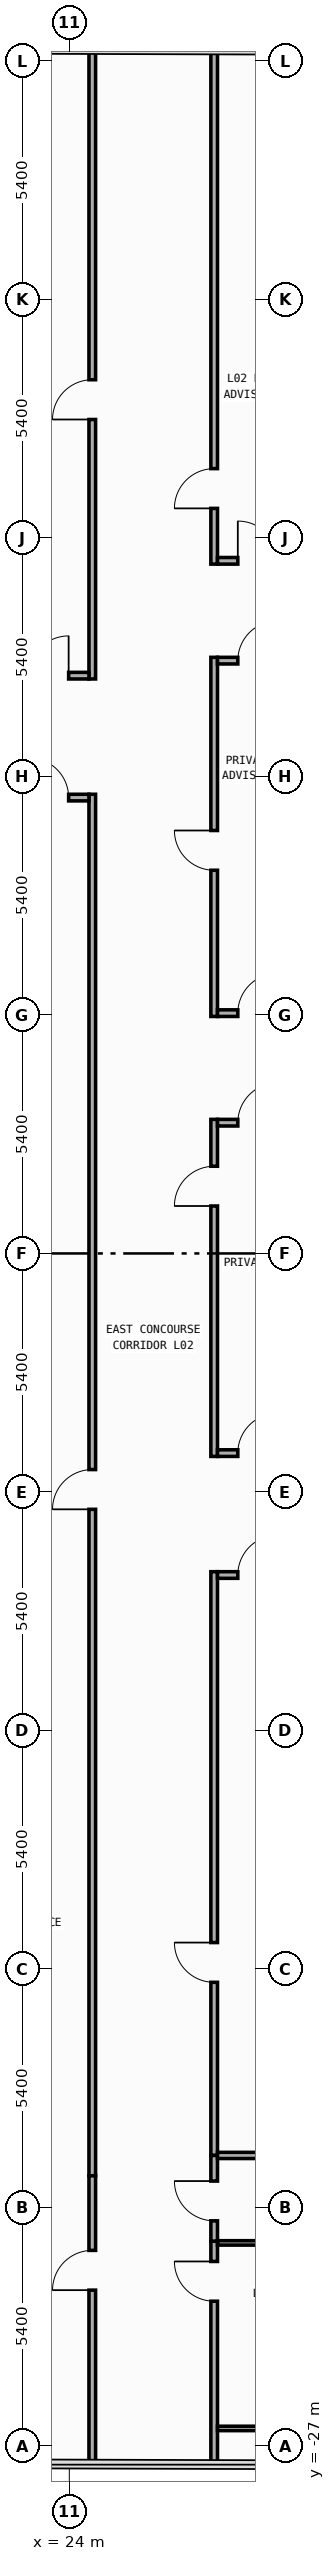
"""IFC4 building model, lengths in metres.
Left out: names, types, materials, properties, quantities, classifications, styles, units other than length and angle.
Written with IfcOpenShell. Run it as: python <this file> out.ifc"""

import sys

from ifc_helpers import new_model, si_unit, direction, frame, frame_2d, origin, place, context, subcontext, project, spatial, rectangle, extrude, element, fill, save


model = new_model("IFC4")
c1 = context("Model", 3, precision=1e-05, world=origin(), true_north=direction((0.0, 1.0)))
c2 = subcontext(c1, "Body", "Model", "MODEL_VIEW")
j1 = project(units=[si_unit("LENGTHUNIT", "METRE"), si_unit("PLANEANGLEUNIT", "RADIAN")], contexts=[c1])
p1 = place(None, origin())
s1 = spatial("IfcSite", under=j1, at=p1, CompositionType="ELEMENT")
p2 = place(p1, origin())
s2 = spatial("IfcBuilding", under=s1, at=p2, CompositionType="ELEMENT")
p3 = place(p2, frame((0.0, 0.0, 6.0)))
s3 = spatial("IfcBuildingStorey", under=s2, at=p3, CompositionType="ELEMENT", Elevation=6.0)
p4 = place(p3, frame((27.28, -4.595, 0.0), z_axis=(0.0, 0.0, 1.0), x_axis=(0.0, 1.0, 0.0)))
e1 = element("IfcWall", 1, at=p4, inside=s3, PredefinedType="PARTITIONING", context=c2, shape_type="SweptSolid", body=[
    extrude(rectangle(XDim=7.63, YDim=0.15, at=frame_2d((3.815, 0.0))), origin(), (0.0, 0.0, 1.0), 4.7),
])
p5 = place(p4, frame((5.669, 0.0, 0.0)))
e2 = element("IfcOpeningElement", 2, at=p5, cuts=e1, PredefinedType="OPENING", context=c2, shape_type="SweptSolid", body=[
    extrude(rectangle(XDim=0.9, YDim=2.15, at=frame_2d((0.45, 1.075))), frame((0.0, 0.085, 0.0), z_axis=(0.0, -1.0, 0.0), x_axis=(1.0, 0.0, 0.0)), (0.0, 0.0, 1.0), 0.17),
])
p6 = place(p3, frame((27.28, 5.365, 0.0), z_axis=(0.0, 0.0, 1.0), x_axis=(0.0, 1.0, 0.0)))
e3 = element("IfcWall", 3, at=p6, inside=s3, PredefinedType="PARTITIONING", context=c2, shape_type="SweptSolid", body=[
    extrude(rectangle(XDim=8.13, YDim=0.15, at=frame_2d((4.065, 0.0))), origin(), (0.0, 0.0, 1.0), 4.7),
])
p7 = place(p6, frame((3.31, 0.0, 0.0)))
e4 = element("IfcOpeningElement", 4, at=p7, cuts=e3, PredefinedType="OPENING", context=c2, shape_type="SweptSolid", body=[
    extrude(rectangle(XDim=0.9, YDim=2.15, at=frame_2d((0.45, 1.075))), frame((0.0, 0.085, 0.0), z_axis=(0.0, -1.0, 0.0), x_axis=(1.0, 0.0, 0.0)), (0.0, 0.0, 1.0), 0.17),
])
p8 = place(p3, frame((24.52, 13.005, 0.0), z_axis=(0.0, 0.0, 1.0), x_axis=(0.0, 1.0, 0.0)))
e5 = element("IfcWall", 5, at=p8, inside=s3, PredefinedType="PARTITIONING", context=c2, shape_type="SweptSolid", body=[
    extrude(rectangle(XDim=14.253, YDim=0.15, at=frame_2d((7.126, 0.0))), origin(), (0.0, 0.0, 1.0), 4.7),
])
p9 = place(p8, frame((5.874, 0.0, 0.0)))
e6 = element("IfcOpeningElement", 6, at=p9, cuts=e5, PredefinedType="OPENING", context=c2, shape_type="SweptSolid", body=[
    extrude(rectangle(XDim=0.9, YDim=2.15, at=frame_2d((0.45, 1.075))), frame((0.0, 0.085, 0.0), z_axis=(0.0, -1.0, 0.0), x_axis=(1.0, 0.0, 0.0)), (0.0, 0.0, 1.0), 0.17),
])
p10 = place(p3, frame((27.28, -27.421, 0.0), z_axis=(0.0, 0.0, 1.0), x_axis=(0.0, 1.0, 0.0)))
e7 = element("IfcWall", 7, at=p10, inside=s3, PredefinedType="PARTITIONING", context=c2, shape_type="SweptSolid", body=[
    extrude(rectangle(XDim=5.061, YDim=0.15, at=frame_2d((2.531, 0.0))), origin(), (0.0, 0.0, 1.0), 4.7),
])
p11 = place(p10, frame((3.701, 0.0, 0.0)))
e8 = element("IfcOpeningElement", 8, at=p11, cuts=e7, PredefinedType="OPENING", context=c2, shape_type="SweptSolid", body=[
    extrude(rectangle(XDim=0.9, YDim=2.15, at=frame_2d((0.45, 1.075))), frame((0.0, 0.085, 0.0), z_axis=(0.0, -1.0, 0.0), x_axis=(1.0, 0.0, 0.0)), (0.0, 0.0, 1.0), 0.17),
])
p12 = place(p3, frame((24.52, -20.88, 0.0), z_axis=(0.0, 0.0, 1.0), x_axis=(0.0, 1.0, 0.0)))
e9 = element("IfcWall", 9, at=p12, inside=s3, PredefinedType="PARTITIONING", context=c2, shape_type="SweptSolid", body=[
    extrude(rectangle(XDim=31.275, YDim=0.15, at=frame_2d((15.637, 0.0))), origin(), (0.0, 0.0, 1.0), 4.7),
])
p13 = place(p12, frame((15.087, 0.0, 0.0)))
e10 = element("IfcOpeningElement", 10, at=p13, cuts=e9, PredefinedType="OPENING", context=c2, shape_type="SweptSolid", body=[
    extrude(rectangle(XDim=0.9, YDim=2.15, at=frame_2d((0.45, 1.075))), frame((0.0, 0.085, 0.0), z_axis=(0.0, -1.0, 0.0), x_axis=(1.0, 0.0, 0.0)), (0.0, 0.0, 1.0), 0.17),
])
p14 = place(p3, frame((27.28, -20.42, 0.0), z_axis=(0.0, 0.0, 1.0), x_axis=(0.0, 1.0, 0.0)))
e11 = element("IfcWall", 11, at=p14, inside=s3, PredefinedType="PARTITIONING", context=c2, shape_type="SweptSolid", body=[
    extrude(rectangle(XDim=13.215, YDim=0.15, at=frame_2d((6.607, 0.0))), origin(), (0.0, 0.0, 1.0), 4.7),
])
p15 = place(p14, frame((3.919, 0.0, 0.0)))
e12 = element("IfcOpeningElement", 12, at=p15, cuts=e11, PredefinedType="OPENING", context=c2, shape_type="SweptSolid", body=[
    extrude(rectangle(XDim=0.9, YDim=2.15, at=frame_2d((0.45, 1.075))), frame((0.0, 0.085, 0.0), z_axis=(0.0, -1.0, 0.0), x_axis=(1.0, 0.0, 0.0)), (0.0, 0.0, 1.0), 0.17),
])
p16 = place(p3, frame((24.52, -27.413, 0.0), z_axis=(0.0, 0.0, 1.0), x_axis=(0.0, 1.0, 0.0)))
e13 = element("IfcWall", 13, at=p16, inside=s3, PredefinedType="PARTITIONING", context=c2, shape_type="SweptSolid", body=[
    extrude(rectangle(XDim=6.533, YDim=0.15, at=frame_2d((3.266, 0.0))), origin(), (0.0, 0.0, 1.0), 4.7),
])
p17 = place(p16, frame((3.943, 0.0, 0.0)))
e14 = element("IfcOpeningElement", 14, at=p17, cuts=e13, PredefinedType="OPENING", context=c2, shape_type="SweptSolid", body=[
    extrude(rectangle(XDim=0.9, YDim=2.15, at=frame_2d((0.45, 1.075))), frame((0.0, 0.085, 0.0), z_axis=(0.0, -1.0, 0.0), x_axis=(1.0, 0.0, 0.0)), (0.0, 0.0, 1.0), 0.17),
])
p18 = place(p3, frame((27.28, -22.36, 0.0), z_axis=(0.0, 0.0, 1.0), x_axis=(0.0, 1.0, 0.0)))
e15 = element("IfcWall", 15, at=p18, inside=s3, PredefinedType="PARTITIONING", context=c2, shape_type="SweptSolid", body=[
    extrude(rectangle(XDim=1.94, YDim=0.15, at=frame_2d((0.97, 0.0))), origin(), (0.0, 0.0, 1.0), 4.7),
])
p19 = place(p18, frame((0.46, 0.0, 0.0)))
e16 = element("IfcOpeningElement", 16, at=p19, cuts=e15, PredefinedType="OPENING", context=c2, shape_type="SweptSolid", body=[
    extrude(rectangle(XDim=0.9, YDim=2.15, at=frame_2d((0.45, 1.075))), frame((0.0, 0.085, 0.0), z_axis=(0.0, -1.0, 0.0), x_axis=(1.0, 0.0, 0.0)), (0.0, 0.0, 1.0), 0.17),
])
p20 = place(p3, frame((27.28, 15.605, 0.0), z_axis=(0.0, 0.0, 1.0), x_axis=(0.0, 1.0, 0.0)))
e17 = element("IfcWall", 17, at=p20, inside=s3, PredefinedType="PARTITIONING", context=c2, shape_type="SweptSolid", body=[
    extrude(rectangle(XDim=11.644, YDim=0.15, at=frame_2d((5.822, 0.0))), origin(), (0.0, 0.0, 1.0), 4.7),
])
p21 = place(p20, frame((1.262, 0.0, 0.0)))
e18 = element("IfcOpeningElement", 18, at=p21, cuts=e17, PredefinedType="OPENING", context=c2, shape_type="SweptSolid", body=[
    extrude(rectangle(XDim=0.9, YDim=2.15, at=frame_2d((0.45, 1.075))), frame((0.0, 0.085, 0.0), z_axis=(0.0, -1.0, 0.0), x_axis=(1.0, 0.0, 0.0)), (0.0, 0.0, 1.0), 0.17),
])
p22 = place(p3, frame((27.355, 2.96, 0.0), z_axis=(0.0, 0.0, 1.0), x_axis=(1.0, 0.0, 0.0)))
e19 = element("IfcWall", 19, at=p22, inside=s3, PredefinedType="PARTITIONING", context=c2, shape_type="SweptSolid", body=[
    extrude(rectangle(XDim=2.645, YDim=0.15, at=frame_2d((1.323, 0.0))), origin(), (0.0, 0.0, 1.0), 4.7),
])
p23 = place(p22, frame((0.46, 0.0, 0.0)))
e20 = element("IfcOpeningElement", 20, at=p23, cuts=e19, PredefinedType="OPENING", context=c2, shape_type="SweptSolid", body=[
    extrude(rectangle(XDim=0.9, YDim=2.15, at=frame_2d((0.45, 1.075))), frame((0.0, 0.085, 0.0), z_axis=(0.0, -1.0, 0.0), x_axis=(1.0, 0.0, 0.0)), (0.0, 0.0, 1.0), 0.17),
])
p24 = place(p3, frame((27.355, 5.44, 0.0), z_axis=(0.0, 0.0, 1.0), x_axis=(1.0, 0.0, 0.0)))
e21 = element("IfcWall", 21, at=p24, inside=s3, PredefinedType="PARTITIONING", context=c2, shape_type="SweptSolid", body=[
    extrude(rectangle(XDim=2.645, YDim=0.15, at=frame_2d((1.323, 0.0))), origin(), (0.0, 0.0, 1.0), 3.8),
])
p25 = place(p24, frame((0.46, 0.0, 0.0)))
e22 = element("IfcOpeningElement", 22, at=p25, cuts=e21, PredefinedType="OPENING", context=c2, shape_type="SweptSolid", body=[
    extrude(rectangle(XDim=0.9, YDim=2.15, at=frame_2d((0.45, 1.075))), frame((0.0, 0.085, 0.0), z_axis=(0.0, -1.0, 0.0), x_axis=(1.0, 0.0, 0.0)), (0.0, 0.0, 1.0), 0.17),
])
p26 = place(p3, frame((27.355, 13.42, 0.0), z_axis=(0.0, 0.0, 1.0), x_axis=(1.0, 0.0, 0.0)))
e23 = element("IfcWall", 23, at=p26, inside=s3, PredefinedType="PARTITIONING", context=c2, shape_type="SweptSolid", body=[
    extrude(rectangle(XDim=2.645, YDim=0.15, at=frame_2d((1.323, 0.0))), origin(), (0.0, 0.0, 1.0), 4.7),
])
p27 = place(p26, frame((0.46, 0.0, 0.0)))
e24 = element("IfcOpeningElement", 24, at=p27, cuts=e23, PredefinedType="OPENING", context=c2, shape_type="SweptSolid", body=[
    extrude(rectangle(XDim=0.9, YDim=2.15, at=frame_2d((0.45, 1.075))), frame((0.0, 0.085, 0.0), z_axis=(0.0, -1.0, 0.0), x_axis=(1.0, 0.0, 0.0)), (0.0, 0.0, 1.0), 0.17),
])
p28 = place(p3, frame((27.355, 15.68, 0.0), z_axis=(0.0, 0.0, 1.0), x_axis=(1.0, 0.0, 0.0)))
e25 = element("IfcWall", 25, at=p28, inside=s3, PredefinedType="PARTITIONING", context=c2, shape_type="SweptSolid", body=[
    extrude(rectangle(XDim=2.645, YDim=0.15, at=frame_2d((1.323, 0.0))), origin(), (0.0, 0.0, 1.0), 4.7),
])
p29 = place(p28, frame((0.46, 0.0, 0.0)))
e26 = element("IfcOpeningElement", 26, at=p29, cuts=e25, PredefinedType="OPENING", context=c2, shape_type="SweptSolid", body=[
    extrude(rectangle(XDim=0.9, YDim=2.15, at=frame_2d((0.45, 1.075))), frame((0.0, 0.085, 0.0), z_axis=(0.0, -1.0, 0.0), x_axis=(1.0, 0.0, 0.0)), (0.0, 0.0, 1.0), 0.17),
])
p30 = place(p3, frame((14.28, 13.08, 0.0), z_axis=(0.0, 0.0, 1.0), x_axis=(1.0, 0.0, 0.0)))
e27 = element("IfcWall", 27, at=p30, inside=s3, PredefinedType="PARTITIONING", context=c2, shape_type="SweptSolid", body=[
    extrude(rectangle(XDim=10.165, YDim=0.15, at=frame_2d((5.083, 0.0))), origin(), (0.0, 0.0, 1.0), 4.7),
])
p31 = place(p30, frame((8.805, 0.0, 0.0)))
e28 = element("IfcOpeningElement", 28, at=p31, cuts=e27, PredefinedType="OPENING", context=c2, shape_type="SweptSolid", body=[
    extrude(rectangle(XDim=0.9, YDim=2.15, at=frame_2d((0.45, 1.075))), frame((0.0, 0.085, 0.0), z_axis=(0.0, -1.0, 0.0), x_axis=(1.0, 0.0, 0.0)), (0.0, 0.0, 1.0), 0.17),
])
p32 = place(p3, frame((20.475, 10.32, 0.0), z_axis=(0.0, 0.0, 1.0), x_axis=(1.0, 0.0, 0.0)))
e29 = element("IfcWall", 29, at=p32, inside=s3, PredefinedType="PARTITIONING", context=c2, shape_type="SweptSolid", body=[
    extrude(rectangle(XDim=3.97, YDim=0.15, at=frame_2d((1.985, 0.0))), origin(), (0.0, 0.0, 1.0), 4.7),
])
p33 = place(p32, frame((2.61, 0.0, 0.0)))
e30 = element("IfcOpeningElement", 30, at=p33, cuts=e29, PredefinedType="OPENING", context=c2, shape_type="SweptSolid", body=[
    extrude(rectangle(XDim=0.9, YDim=2.15, at=frame_2d((0.45, 1.075))), frame((0.0, 0.085, 0.0), z_axis=(0.0, -1.0, 0.0), x_axis=(1.0, 0.0, 0.0)), (0.0, 0.0, 1.0), 0.17),
])
p34 = place(p3, frame((27.355, -4.52, 0.0), z_axis=(0.0, 0.0, 1.0), x_axis=(1.0, 0.0, 0.0)))
e31 = element("IfcWall", 31, at=p34, inside=s3, PredefinedType="PARTITIONING", context=c2, shape_type="SweptSolid", body=[
    extrude(rectangle(XDim=2.645, YDim=0.15, at=frame_2d((1.323, 0.0))), origin(), (0.0, 0.0, 1.0), 4.7),
])
p35 = place(p34, frame((0.46, 0.0, 0.0)))
e32 = element("IfcOpeningElement", 32, at=p35, cuts=e31, PredefinedType="OPENING", context=c2, shape_type="SweptSolid", body=[
    extrude(rectangle(XDim=0.9, YDim=2.15, at=frame_2d((0.45, 1.075))), frame((0.0, 0.085, 0.0), z_axis=(0.0, -1.0, 0.0), x_axis=(1.0, 0.0, 0.0)), (0.0, 0.0, 1.0), 0.17),
])
p36 = place(p3, frame((27.355, -7.28, 0.0), z_axis=(0.0, 0.0, 1.0), x_axis=(1.0, 0.0, 0.0)))
e33 = element("IfcWall", 33, at=p36, inside=s3, PredefinedType="PARTITIONING", context=c2, shape_type="SweptSolid", body=[
    extrude(rectangle(XDim=3.605, YDim=0.15, at=frame_2d((1.802, 0.0))), origin(), (0.0, 0.0, 1.0), 4.7),
])
p37 = place(p36, frame((0.46, 0.0, 0.0)))
e34 = element("IfcOpeningElement", 34, at=p37, cuts=e33, PredefinedType="OPENING", context=c2, shape_type="SweptSolid", body=[
    extrude(rectangle(XDim=0.9, YDim=2.15, at=frame_2d((0.45, 1.075))), frame((0.0, 0.085, 0.0), z_axis=(0.0, -1.0, 0.0), x_axis=(1.0, 0.0, 0.0)), (0.0, 0.0, 1.0), 0.17),
])
p38 = place(p3, frame((27.355, -20.42, 0.0), z_axis=(0.0, 0.0, 1.0), x_axis=(1.0, 0.0, 0.0)))
e35 = element("IfcWall", 35, at=p38, inside=s3, PredefinedType="PARTITIONING", context=c2, shape_type="SweptSolid", body=[
    extrude(rectangle(XDim=9.09, YDim=0.14, at=frame_2d((4.545, 0.0))), origin(), (0.0, 0.0, 1.0), 4.7),
])
p39 = place(p3, frame((27.355, -22.4, 0.0), z_axis=(0.0, 0.0, 1.0), x_axis=(1.0, 0.0, 0.0)))
e36 = element("IfcWall", 36, at=p39, inside=s3, PredefinedType="PARTITIONING", context=c2, shape_type="SweptSolid", body=[
    extrude(rectangle(XDim=2.845, YDim=0.1, at=frame_2d((1.422, 0.0))), origin(), (0.0, 0.0, 1.0), 4.7),
])
p40 = place(p3, frame((30.15, -26.6, 0.0), z_axis=(0.0, 0.0, 1.0), x_axis=(-1.0, 0.0, 0.0)))
e37 = element("IfcWall", 37, at=p40, inside=s3, PredefinedType="PARTITIONING", context=c2, shape_type="SweptSolid", body=[
    extrude(rectangle(XDim=2.795, YDim=0.1, at=frame_2d((1.397, 0.0))), origin(), (0.0, 0.0, 1.0), 4.7),
])
p41 = place(p5, origin())
e38 = element("IfcDoor", 38, at=p41, inside=s3, OperationType="SINGLE_SWING_LEFT", PredefinedType="DOOR", context=c2, shape_type="SweptSolid", body=[
    extrude(rectangle(XDim=0.9, YDim=2.15, at=frame_2d((0.45, 1.075))), frame((0.0, 0.025, 0.0), z_axis=(0.0, -1.0, 0.0), x_axis=(1.0, 0.0, 0.0)), (0.0, 0.0, 1.0), 0.05),
])
fill(e2, e38)
p42 = place(p7, origin())
e39 = element("IfcDoor", 39, at=p42, inside=s3, OperationType="SINGLE_SWING_RIGHT", PredefinedType="DOOR", context=c2, shape_type="SweptSolid", body=[
    extrude(rectangle(XDim=0.9, YDim=2.15, at=frame_2d((0.45, 1.075))), frame((0.0, 0.025, 0.0), z_axis=(0.0, -1.0, 0.0), x_axis=(1.0, 0.0, 0.0)), (0.0, 0.0, 1.0), 0.05),
])
fill(e4, e39)
p43 = place(p9, origin())
e40 = element("IfcDoor", 40, at=p43, inside=s3, OperationType="SINGLE_SWING_LEFT", PredefinedType="DOOR", context=c2, shape_type="SweptSolid", body=[
    extrude(rectangle(XDim=0.9, YDim=2.15, at=frame_2d((0.45, 1.075))), frame((0.0, 0.025, 0.0), z_axis=(0.0, -1.0, 0.0), x_axis=(1.0, 0.0, 0.0)), (0.0, 0.0, 1.0), 0.05),
])
fill(e6, e40)
p44 = place(p11, origin())
e41 = element("IfcDoor", 41, at=p44, inside=s3, OperationType="SINGLE_SWING_RIGHT", PredefinedType="DOOR", context=c2, shape_type="SweptSolid", body=[
    extrude(rectangle(XDim=0.9, YDim=2.15, at=frame_2d((0.45, 1.075))), frame((0.0, 0.025, 0.0), z_axis=(0.0, -1.0, 0.0), x_axis=(1.0, 0.0, 0.0)), (0.0, 0.0, 1.0), 0.05),
])
fill(e8, e41)
p45 = place(p13, origin())
e42 = element("IfcDoor", 42, at=p45, inside=s3, OperationType="SINGLE_SWING_LEFT", PredefinedType="DOOR", context=c2, shape_type="SweptSolid", body=[
    extrude(rectangle(XDim=0.9, YDim=2.15, at=frame_2d((0.45, 1.075))), frame((0.0, 0.025, 0.0), z_axis=(0.0, -1.0, 0.0), x_axis=(1.0, 0.0, 0.0)), (0.0, 0.0, 1.0), 0.05),
])
fill(e10, e42)
p46 = place(p15, origin())
e43 = element("IfcDoor", 43, at=p46, inside=s3, OperationType="SINGLE_SWING_RIGHT", PredefinedType="DOOR", context=c2, shape_type="SweptSolid", body=[
    extrude(rectangle(XDim=0.9, YDim=2.15, at=frame_2d((0.45, 1.075))), frame((0.0, 0.025, 0.0), z_axis=(0.0, -1.0, 0.0), x_axis=(1.0, 0.0, 0.0)), (0.0, 0.0, 1.0), 0.05),
])
fill(e12, e43)
p47 = place(p17, origin())
e44 = element("IfcDoor", 44, at=p47, inside=s3, OperationType="SINGLE_SWING_LEFT", PredefinedType="DOOR", context=c2, shape_type="SweptSolid", body=[
    extrude(rectangle(XDim=0.9, YDim=2.15, at=frame_2d((0.45, 1.075))), frame((0.0, 0.025, 0.0), z_axis=(0.0, -1.0, 0.0), x_axis=(1.0, 0.0, 0.0)), (0.0, 0.0, 1.0), 0.05),
])
fill(e14, e44)
p48 = place(p19, origin())
e45 = element("IfcDoor", 45, at=p48, inside=s3, OperationType="SINGLE_SWING_RIGHT", PredefinedType="DOOR", context=c2, shape_type="SweptSolid", body=[
    extrude(rectangle(XDim=0.9, YDim=2.15, at=frame_2d((0.45, 1.075))), frame((0.0, 0.025, 0.0), z_axis=(0.0, -1.0, 0.0), x_axis=(1.0, 0.0, 0.0)), (0.0, 0.0, 1.0), 0.05),
])
fill(e16, e45)
p49 = place(p21, origin())
e46 = element("IfcDoor", 46, at=p49, inside=s3, OperationType="SINGLE_SWING_LEFT", PredefinedType="DOOR", context=c2, shape_type="SweptSolid", body=[
    extrude(rectangle(XDim=0.9, YDim=2.15, at=frame_2d((0.45, 1.075))), frame((0.0, 0.025, 0.0), z_axis=(0.0, -1.0, 0.0), x_axis=(1.0, 0.0, 0.0)), (0.0, 0.0, 1.0), 0.05),
])
fill(e18, e46)
p50 = place(p23, origin())
e47 = element("IfcDoor", 47, at=p50, inside=s3, OperationType="SINGLE_SWING_RIGHT", PredefinedType="DOOR", context=c2, shape_type="SweptSolid", body=[
    extrude(rectangle(XDim=0.9, YDim=2.15, at=frame_2d((0.45, 1.075))), frame((0.0, 0.025, 0.0), z_axis=(0.0, -1.0, 0.0), x_axis=(1.0, 0.0, 0.0)), (0.0, 0.0, 1.0), 0.05),
])
fill(e20, e47)
p51 = place(p25, origin())
e48 = element("IfcDoor", 48, at=p51, inside=s3, OperationType="SINGLE_SWING_RIGHT", PredefinedType="DOOR", context=c2, shape_type="SweptSolid", body=[
    extrude(rectangle(XDim=0.9, YDim=2.15, at=frame_2d((0.45, 1.075))), frame((0.0, 0.025, 0.0), z_axis=(0.0, -1.0, 0.0), x_axis=(1.0, 0.0, 0.0)), (0.0, 0.0, 1.0), 0.05),
])
fill(e22, e48)
p52 = place(p27, origin())
e49 = element("IfcDoor", 49, at=p52, inside=s3, OperationType="SINGLE_SWING_RIGHT", PredefinedType="DOOR", context=c2, shape_type="SweptSolid", body=[
    extrude(rectangle(XDim=0.9, YDim=2.15, at=frame_2d((0.45, 1.075))), frame((0.0, 0.025, 0.0), z_axis=(0.0, -1.0, 0.0), x_axis=(1.0, 0.0, 0.0)), (0.0, 0.0, 1.0), 0.05),
])
fill(e24, e49)
p53 = place(p29, origin())
e50 = element("IfcDoor", 50, at=p53, inside=s3, OperationType="SINGLE_SWING_LEFT", PredefinedType="DOOR", context=c2, shape_type="SweptSolid", body=[
    extrude(rectangle(XDim=0.9, YDim=2.15, at=frame_2d((0.45, 1.075))), frame((0.0, 0.025, 0.0), z_axis=(0.0, -1.0, 0.0), x_axis=(1.0, 0.0, 0.0)), (0.0, 0.0, 1.0), 0.05),
])
fill(e26, e50)
p54 = place(p31, origin())
e51 = element("IfcDoor", 51, at=p54, inside=s3, OperationType="SINGLE_SWING_RIGHT", PredefinedType="DOOR", context=c2, shape_type="SweptSolid", body=[
    extrude(rectangle(XDim=0.9, YDim=2.15, at=frame_2d((0.45, 1.075))), frame((0.0, 0.025, 0.0), z_axis=(0.0, -1.0, 0.0), x_axis=(1.0, 0.0, 0.0)), (0.0, 0.0, 1.0), 0.05),
])
fill(e28, e51)
p55 = place(p33, origin())
e52 = element("IfcDoor", 52, at=p55, inside=s3, OperationType="SINGLE_SWING_LEFT", PredefinedType="DOOR", context=c2, shape_type="SweptSolid", body=[
    extrude(rectangle(XDim=0.9, YDim=2.15, at=frame_2d((0.45, 1.075))), frame((0.0, 0.025, 0.0), z_axis=(0.0, -1.0, 0.0), x_axis=(1.0, 0.0, 0.0)), (0.0, 0.0, 1.0), 0.05),
])
fill(e30, e52)
p56 = place(p35, origin())
e53 = element("IfcDoor", 53, at=p56, inside=s3, OperationType="SINGLE_SWING_RIGHT", PredefinedType="DOOR", context=c2, shape_type="SweptSolid", body=[
    extrude(rectangle(XDim=0.9, YDim=2.15, at=frame_2d((0.45, 1.075))), frame((0.0, 0.025, 0.0), z_axis=(0.0, -1.0, 0.0), x_axis=(1.0, 0.0, 0.0)), (0.0, 0.0, 1.0), 0.05),
])
fill(e32, e53)
p57 = place(p37, origin())
e54 = element("IfcDoor", 54, at=p57, inside=s3, OperationType="SINGLE_SWING_RIGHT", PredefinedType="DOOR", context=c2, shape_type="SweptSolid", body=[
    extrude(rectangle(XDim=0.9, YDim=2.15, at=frame_2d((0.45, 1.075))), frame((0.0, 0.025, 0.0), z_axis=(0.0, -1.0, 0.0), x_axis=(1.0, 0.0, 0.0)), (0.0, 0.0, 1.0), 0.05),
])
fill(e34, e54)
save(model, sys.argv[1])
